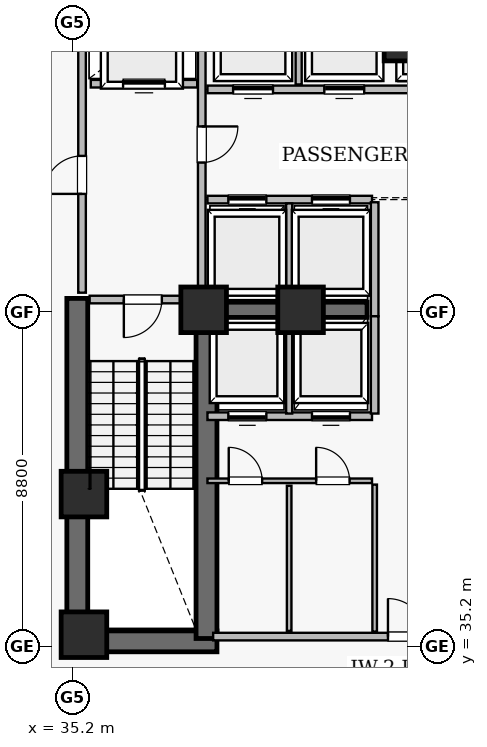
"""IFC4 building model, lengths in metres.
Left out: names, types, materials, properties, quantities, classifications, styles, units other than length and angle.
Written with IfcOpenShell. Run it as: python <this file> out.ifc"""

import sys

from ifc_helpers import new_model, si_unit, direction, frame, frame_2d, origin, origin_2d, place, context, subcontext, project, spatial, rectangle, extrude, element, fill, save


model = new_model("IFC4")
c1 = context("Model", 3, precision=1e-05, world=origin(), true_north=direction((0.0, 1.0)))
c2 = subcontext(c1, "Body", "Model", "MODEL_VIEW")
j1 = project(units=[si_unit("LENGTHUNIT", "METRE"), si_unit("PLANEANGLEUNIT", "RADIAN")], contexts=[c1])
p1 = place(None, origin())
s1 = spatial("IfcSite", under=j1, at=p1, CompositionType="ELEMENT")
p2 = place(p1, origin())
s2 = spatial("IfcBuilding", under=s1, at=p2, CompositionType="ELEMENT")
p3 = place(p2, frame((0.0, 0.0, 95.8)))
s3 = spatial("IfcBuildingStorey", under=s2, at=p3, CompositionType="ELEMENT", Elevation=95.8)
p4 = place(p3, frame((35.05, 35.325, 0.0), z_axis=(0.0, 0.0, 1.0), x_axis=(1.0, 0.0, 0.0)))
e1 = element("IfcWall", 1, at=p4, inside=s3, PredefinedType="SHEAR", context=c2, shape_type="SweptSolid", body=[
    extrude(rectangle(XDim=3.95, YDim=0.55, at=frame_2d((1.975, 0.0))), origin(), (0.0, 0.0, 1.0), 4.335),
])
p5 = place(p3, frame((35.325, 35.05, 0.0), z_axis=(0.0, 0.0, 1.0), x_axis=(0.0, 1.0, 0.0)))
e2 = element("IfcWall", 2, at=p5, inside=s3, PredefinedType="SHEAR", context=c2, shape_type="SweptSolid", body=[
    extrude(rectangle(XDim=9.3, YDim=0.55, at=frame_2d((4.65, 0.0))), origin(), (0.0, 0.0, 1.0), 4.335),
])
p6 = place(p3, frame((38.725, 35.4, 0.0), z_axis=(0.0, 0.0, 1.0), x_axis=(0.0, 1.0, 0.0)))
e3 = element("IfcWall", 3, at=p6, inside=s3, PredefinedType="SHEAR", context=c2, shape_type="SweptSolid", body=[
    extrude(rectangle(XDim=8.95, YDim=0.55, at=frame_2d((4.475, 0.0))), origin(), (0.0, 0.0, 1.0), 4.335),
])
p7 = place(p3, frame((44.0, 50.1, 0.0), z_axis=(0.0, 0.0, 1.0), x_axis=(0.0, 1.0, 0.0)))
e4 = element("IfcWall", 4, at=p7, inside=s3, PredefinedType="SHEAR", context=c2, shape_type="SweptSolid", body=[
    extrude(rectangle(XDim=2.1, YDim=0.4, at=frame_2d((1.05, 0.0))), origin(), (0.0, 0.0, 1.0), 4.335),
])
p8 = place(p3, frame((38.75, 44.05, 0.0), z_axis=(0.0, 0.0, 1.0), x_axis=(1.0, 0.0, 0.0)))
e5 = element("IfcWall", 5, at=p8, inside=s3, PredefinedType="SHEAR", context=c2, shape_type="SweptSolid", body=[
    extrude(rectangle(XDim=4.2, YDim=0.4, at=frame_2d((2.1, 0.0))), origin(), (0.0, 0.0, 1.0), 4.335),
])
for number, where, z_axis, x_axis in (
    (6, (35.5, 35.5, 0.0), (0.0, 0.0, 1.0), (1.0, 0.0, 0.0)),
    (7, (38.65, 44.05, 0.0), (0.0, 0.0, 1.0), (1.0, 0.0, 0.0)),
    (8, (44.0, 51.2, 0.0), (0.0, 0.0, 1.0), (1.0, 0.0, 0.0)),
    (9, (35.5, 39.2, 0.0), (0.0, 0.0, 1.0), (1.0, 0.0, 0.0)),
    (10, (41.2, 44.05, 0.0), (0.0, 0.0, 1.0), (1.0, 0.0, 0.0)),
):
    element("IfcColumn", number, at=place(p3, frame(where, z_axis=z_axis, x_axis=x_axis)), inside=s3, PredefinedType="COLUMN", context=c2, shape_type="SweptSolid", body=[
        extrude(rectangle(XDim=1.2, YDim=1.2, at=origin_2d()), origin(), (0.0, 0.0, 1.0), 4.6),
    ])
p9 = place(p3, frame((38.9, 35.45, 0.0), z_axis=(0.0, 0.0, 1.0), x_axis=(1.0, 0.0, 0.0)))
e11 = element("IfcWall", 11, at=p9, inside=s3, PredefinedType="SOLIDWALL", context=c2, shape_type="SweptSolid", body=[
    extrude(rectangle(XDim=10.2, YDim=0.2, at=frame_2d((5.1, 0.0))), origin(), (0.0, 0.0, 1.0), 4.335),
])
p10 = place(p9, frame((4.6, 0.0, 0.0)))
e12 = element("IfcOpeningElement", 12, at=p10, cuts=e11, PredefinedType="OPENING", context=c2, shape_type="SweptSolid", body=[
    extrude(rectangle(XDim=1.0, YDim=2.15, at=frame_2d((0.5, 1.075))), frame((0.0, 0.11, 0.0), z_axis=(0.0, -1.0, 0.0), x_axis=(1.0, 0.0, 0.0)), (0.0, 0.0, 1.0), 0.22),
])
p11 = place(p3, frame((35.45, 44.5, 0.0), z_axis=(0.0, 0.0, 1.0), x_axis=(0.0, 1.0, 0.0)))
e13 = element("IfcWall", 13, at=p11, inside=s3, PredefinedType="SOLIDWALL", context=c2, shape_type="SweptSolid", body=[
    extrude(rectangle(XDim=7.92, YDim=0.2, at=frame_2d((3.96, 0.0))), origin(), (0.0, 0.0, 1.0), 4.335),
])
p12 = place(p11, frame((2.6, 0.0, 0.0)))
e14 = element("IfcOpeningElement", 14, at=p12, cuts=e13, PredefinedType="OPENING", context=c2, shape_type="SweptSolid", body=[
    extrude(rectangle(XDim=1.0, YDim=2.15, at=frame_2d((0.5, 1.075))), frame((0.0, 0.11, 0.0), z_axis=(0.0, -1.0, 0.0), x_axis=(1.0, 0.0, 0.0)), (0.0, 0.0, 1.0), 0.22),
])
p13 = place(p3, frame((38.6, 44.5, 0.0), z_axis=(0.0, 0.0, 1.0), x_axis=(0.0, 1.0, 0.0)))
e15 = element("IfcWall", 15, at=p13, inside=s3, PredefinedType="SOLIDWALL", context=c2, shape_type="SweptSolid", body=[
    extrude(rectangle(XDim=7.92, YDim=0.2, at=frame_2d((3.96, 0.0))), origin(), (0.0, 0.0, 1.0), 4.335),
])
p14 = place(p13, frame((3.425, 0.0, 0.0)))
e16 = element("IfcOpeningElement", 16, at=p14, cuts=e15, PredefinedType="OPENING", context=c2, shape_type="SweptSolid", body=[
    extrude(rectangle(XDim=0.95, YDim=2.15, at=frame_2d((0.475, 1.075))), frame((0.0, 0.11, 0.0), z_axis=(0.0, -1.0, 0.0), x_axis=(1.0, 0.0, 0.0)), (0.0, 0.0, 1.0), 0.22),
])
p15 = place(p3, frame((38.75, 49.85, 0.0), z_axis=(0.0, 0.0, 1.0), x_axis=(1.0, 0.0, 0.0)))
e17 = element("IfcWall", 17, at=p15, inside=s3, PredefinedType="SOLIDWALL", context=c2, shape_type="SweptSolid", body=[
    extrude(rectangle(XDim=5.5, YDim=0.2, at=frame_2d((2.75, 0.0))), origin(), (0.0, 0.0, 1.0), 4.335),
])
p16 = place(p15, frame((0.675, 0.0, 0.0)))
e18 = element("IfcOpeningElement", 18, at=p16, cuts=e17, PredefinedType="OPENING", context=c2, shape_type="SweptSolid", body=[
    extrude(rectangle(XDim=1.05, YDim=2.15, at=frame_2d((0.525, 1.075))), frame((0.0, 0.11, 0.0), z_axis=(0.0, -1.0, 0.0), x_axis=(1.0, 0.0, 0.0)), (0.0, 0.0, 1.0), 0.22),
])
p17 = place(p15, frame((3.075, 0.0, 0.0)))
e19 = element("IfcOpeningElement", 19, at=p17, cuts=e17, PredefinedType="OPENING", context=c2, shape_type="SweptSolid", body=[
    extrude(rectangle(XDim=1.05, YDim=2.15, at=frame_2d((0.525, 1.075))), frame((0.0, 0.11, 0.0), z_axis=(0.0, -1.0, 0.0), x_axis=(1.0, 0.0, 0.0)), (0.0, 0.0, 1.0), 0.22),
])
p18 = place(p3, frame((38.75, 46.95, 0.0), z_axis=(0.0, 0.0, 1.0), x_axis=(1.0, 0.0, 0.0)))
e20 = element("IfcWall", 20, at=p18, inside=s3, PredefinedType="SOLIDWALL", context=c2, shape_type="SweptSolid", body=[
    extrude(rectangle(XDim=4.33, YDim=0.2, at=frame_2d((2.165, 0.0))), origin(), (0.0, 0.0, 1.0), 4.335),
])
p19 = place(p18, frame((0.55, 0.0, 0.0)))
e21 = element("IfcOpeningElement", 21, at=p19, cuts=e20, PredefinedType="OPENING", context=c2, shape_type="SweptSolid", body=[
    extrude(rectangle(XDim=1.0, YDim=2.15, at=frame_2d((0.5, 1.075))), frame((0.0, 0.11, 0.0), z_axis=(0.0, -1.0, 0.0), x_axis=(1.0, 0.0, 0.0)), (0.0, 0.0, 1.0), 0.22),
])
p20 = place(p18, frame((2.75, 0.0, 0.0)))
e22 = element("IfcOpeningElement", 22, at=p20, cuts=e20, PredefinedType="OPENING", context=c2, shape_type="SweptSolid", body=[
    extrude(rectangle(XDim=1.0, YDim=2.15, at=frame_2d((0.5, 1.075))), frame((0.0, 0.11, 0.0), z_axis=(0.0, -1.0, 0.0), x_axis=(1.0, 0.0, 0.0)), (0.0, 0.0, 1.0), 0.22),
])
p21 = place(p3, frame((38.75, 41.25, 0.0), z_axis=(0.0, 0.0, 1.0), x_axis=(1.0, 0.0, 0.0)))
e23 = element("IfcWall", 23, at=p21, inside=s3, PredefinedType="SOLIDWALL", context=c2, shape_type="SweptSolid", body=[
    extrude(rectangle(XDim=4.33, YDim=0.2, at=frame_2d((2.165, 0.0))), origin(), (0.0, 0.0, 1.0), 4.335),
])
p22 = place(p21, frame((0.55, 0.0, 0.0)))
e24 = element("IfcOpeningElement", 24, at=p22, cuts=e23, PredefinedType="OPENING", context=c2, shape_type="SweptSolid", body=[
    extrude(rectangle(XDim=1.0, YDim=2.15, at=frame_2d((0.5, 1.075))), frame((0.0, 0.11, 0.0), z_axis=(0.0, -1.0, 0.0), x_axis=(1.0, 0.0, 0.0)), (0.0, 0.0, 1.0), 0.22),
])
p23 = place(p21, frame((2.75, 0.0, 0.0)))
e25 = element("IfcOpeningElement", 25, at=p23, cuts=e23, PredefinedType="OPENING", context=c2, shape_type="SweptSolid", body=[
    extrude(rectangle(XDim=1.0, YDim=2.15, at=frame_2d((0.5, 1.075))), frame((0.0, 0.11, 0.0), z_axis=(0.0, -1.0, 0.0), x_axis=(1.0, 0.0, 0.0)), (0.0, 0.0, 1.0), 0.22),
])
p24 = place(p3, frame((38.75, 39.55, 0.0), z_axis=(0.0, 0.0, 1.0), x_axis=(1.0, 0.0, 0.0)))
e26 = element("IfcWall", 26, at=p24, inside=s3, PredefinedType="PARTITIONING", context=c2, shape_type="SweptSolid", body=[
    extrude(rectangle(XDim=4.33, YDim=0.12, at=frame_2d((2.165, 0.0))), origin(), (0.0, 0.0, 1.0), 4.335),
])
p25 = place(p24, frame((0.56, 0.0, 0.0)))
e27 = element("IfcOpeningElement", 27, at=p25, cuts=e26, PredefinedType="OPENING", context=c2, shape_type="SweptSolid", body=[
    extrude(rectangle(XDim=0.88, YDim=2.1, at=frame_2d((0.44, 1.05))), frame((0.0, 0.07, 0.0), z_axis=(0.0, -1.0, 0.0), x_axis=(1.0, 0.0, 0.0)), (0.0, 0.0, 1.0), 0.14),
])
p26 = place(p24, frame((2.86, 0.0, 0.0)))
e28 = element("IfcOpeningElement", 28, at=p26, cuts=e26, PredefinedType="OPENING", context=c2, shape_type="SweptSolid", body=[
    extrude(rectangle(XDim=0.88, YDim=2.1, at=frame_2d((0.44, 1.05))), frame((0.0, 0.07, 0.0), z_axis=(0.0, -1.0, 0.0), x_axis=(1.0, 0.0, 0.0)), (0.0, 0.0, 1.0), 0.14),
])
p27 = place(p3, frame((35.65, 44.32, 0.0), z_axis=(0.0, 0.0, 1.0), x_axis=(1.0, 0.0, 0.0)))
e29 = element("IfcWall", 29, at=p27, inside=s3, PredefinedType="SOLIDWALL", context=c2, shape_type="SweptSolid", body=[
    extrude(rectangle(XDim=2.8, YDim=0.2, at=frame_2d((1.4, 0.0))), origin(), (0.0, 0.0, 1.0), 4.335),
])
p28 = place(p27, frame((0.9, 0.0, 0.0)))
e30 = element("IfcOpeningElement", 30, at=p28, cuts=e29, PredefinedType="OPENING", context=c2, shape_type="SweptSolid", body=[
    extrude(rectangle(XDim=1.0, YDim=2.15, at=frame_2d((0.5, 1.075))), frame((0.0, 0.11, 0.0), z_axis=(0.0, -1.0, 0.0), x_axis=(1.0, 0.0, 0.0)), (0.0, 0.0, 1.0), 0.22),
])
p29 = place(p3, frame((35.68, 50.0, 0.0), z_axis=(0.0, 0.0, 1.0), x_axis=(1.0, 0.0, 0.0)))
e31 = element("IfcWall", 31, at=p29, inside=s3, PredefinedType="SOLIDWALL", context=c2, shape_type="SweptSolid", body=[
    extrude(rectangle(XDim=2.8, YDim=0.2, at=frame_2d((1.4, 0.0))), origin(), (0.0, 0.0, 1.0), 4.335),
])
p30 = place(p29, frame((0.85, 0.0, 0.0)))
e32 = element("IfcOpeningElement", 32, at=p30, cuts=e31, PredefinedType="OPENING", context=c2, shape_type="SweptSolid", body=[
    extrude(rectangle(XDim=1.1, YDim=2.15, at=frame_2d((0.55, 1.075))), frame((0.0, 0.11, 0.0), z_axis=(0.0, -1.0, 0.0), x_axis=(1.0, 0.0, 0.0)), (0.0, 0.0, 1.0), 0.22),
])
p31 = place(p3, frame((43.15, 35.58, 0.0), z_axis=(0.0, 0.0, 1.0), x_axis=(0.0, 1.0, 0.0)))
e33 = element("IfcWall", 33, at=p31, inside=s3, PredefinedType="PARTITIONING", context=c2, shape_type="SweptSolid", body=[
    extrude(rectangle(XDim=3.87, YDim=0.12, at=frame_2d((1.935, 0.0))), origin(), (0.0, 0.0, 1.0), 4.335),
])
p32 = place(p3, frame((40.9, 35.6, 0.0), z_axis=(0.0, 0.0, 1.0), x_axis=(0.0, 1.0, 0.0)))
e34 = element("IfcWall", 34, at=p32, inside=s3, PredefinedType="PARTITIONING", context=c2, shape_type="SweptSolid", body=[
    extrude(rectangle(XDim=3.82, YDim=0.12, at=frame_2d((1.91, 0.0))), origin(), (0.0, 0.0, 1.0), 4.335),
])
p33 = place(p3, frame((43.15, 43.88, 0.0), z_axis=(0.0, 0.0, 1.0), x_axis=(0.0, 1.0, 0.0)))
e35 = element("IfcWall", 35, at=p33, inside=s3, PredefinedType="SOLIDWALL", context=c2, shape_type="SweptSolid", body=[
    extrude(rectangle(XDim=3.0, YDim=0.2, at=frame_2d((1.5, 0.0))), origin(), (0.0, 0.0, 1.0), 4.335),
])
p34 = place(p3, frame((43.15, 41.32, 0.0), z_axis=(0.0, 0.0, 1.0), x_axis=(0.0, 1.0, 0.0)))
e36 = element("IfcWall", 36, at=p34, inside=s3, PredefinedType="SOLIDWALL", context=c2, shape_type="SweptSolid", body=[
    extrude(rectangle(XDim=2.56, YDim=0.2, at=frame_2d((1.28, 0.0))), origin(), (0.0, 0.0, 1.0), 4.335),
])
p35 = place(p3, frame((40.9, 44.3, 0.0), z_axis=(0.0, 0.0, 1.0), x_axis=(0.0, 1.0, 0.0)))
e37 = element("IfcWall", 37, at=p35, inside=s3, PredefinedType="SOLIDWALL", context=c2, shape_type="SweptSolid", body=[
    extrude(rectangle(XDim=2.55, YDim=0.16, at=frame_2d((1.275, 0.0))), origin(), (0.0, 0.0, 1.0), 4.335),
])
p36 = place(p3, frame((40.9, 41.32, 0.0), z_axis=(0.0, 0.0, 1.0), x_axis=(0.0, 1.0, 0.0)))
e38 = element("IfcWall", 38, at=p36, inside=s3, PredefinedType="SOLIDWALL", context=c2, shape_type="SweptSolid", body=[
    extrude(rectangle(XDim=2.53, YDim=0.16, at=frame_2d((1.265, 0.0))), origin(), (0.0, 0.0, 1.0), 4.335),
])
p37 = place(p3, frame((41.15, 49.98, 0.0), z_axis=(0.0, 0.0, 1.0), x_axis=(0.0, 1.0, 0.0)))
e39 = element("IfcWall", 39, at=p37, inside=s3, PredefinedType="SOLIDWALL", context=c2, shape_type="SweptSolid", body=[
    extrude(rectangle(XDim=2.37, YDim=0.16, at=frame_2d((1.185, 0.0))), origin(), (0.0, 0.0, 1.0), 4.335),
])
p38 = place(p28, frame((1.0, 0.0, 0.0), z_axis=(0.0, 0.0, 1.0), x_axis=(-1.0, 0.0, 0.0)))
e40 = element("IfcDoor", 40, at=p38, inside=s3, OperationType="SINGLE_SWING_LEFT", PredefinedType="DOOR", context=c2, shape_type="SweptSolid", body=[
    extrude(rectangle(XDim=1.0, YDim=2.15, at=frame_2d((0.5, 1.075))), frame((0.0, 0.025, 0.0), z_axis=(0.0, -1.0, 0.0), x_axis=(1.0, 0.0, 0.0)), (0.0, 0.0, 1.0), 0.05),
])
fill(e30, e40)
p39 = place(p12, origin())
e41 = element("IfcDoor", 41, at=p39, inside=s3, OperationType="SINGLE_SWING_LEFT", PredefinedType="DOOR", context=c2, shape_type="SweptSolid", body=[
    extrude(rectangle(XDim=1.0, YDim=2.15, at=frame_2d((0.5, 1.075))), frame((0.0, 0.025, 0.0), z_axis=(0.0, -1.0, 0.0), x_axis=(1.0, 0.0, 0.0)), (0.0, 0.0, 1.0), 0.05),
])
fill(e14, e41)
p40 = place(p14, frame((0.95, 0.0, 0.0), z_axis=(0.0, 0.0, 1.0), x_axis=(-1.0, 0.0, 0.0)))
e42 = element("IfcDoor", 42, at=p40, inside=s3, OperationType="SINGLE_SWING_RIGHT", PredefinedType="DOOR", context=c2, shape_type="SweptSolid", body=[
    extrude(rectangle(XDim=0.95, YDim=2.15, at=frame_2d((0.475, 1.075))), frame((0.0, 0.025, 0.0), z_axis=(0.0, -1.0, 0.0), x_axis=(1.0, 0.0, 0.0)), (0.0, 0.0, 1.0), 0.05),
])
fill(e16, e42)
p41 = place(p30, origin())
e43 = element("IfcDoor", 43, at=p41, inside=s3, OperationType="SLIDING_TO_LEFT", PredefinedType="DOOR", context=c2, shape_type="SweptSolid", body=[
    extrude(rectangle(XDim=1.1, YDim=2.15, at=frame_2d((0.55, 1.075))), frame((0.0, 0.025, 0.0), z_axis=(0.0, -1.0, 0.0), x_axis=(1.0, 0.0, 0.0)), (0.0, 0.0, 1.0), 0.05),
])
fill(e32, e43)
p42 = place(p10, origin())
e44 = element("IfcDoor", 44, at=p42, inside=s3, OperationType="SINGLE_SWING_LEFT", PredefinedType="DOOR", context=c2, shape_type="SweptSolid", body=[
    extrude(rectangle(XDim=1.0, YDim=2.15, at=frame_2d((0.5, 1.075))), frame((0.0, 0.025, 0.0), z_axis=(0.0, -1.0, 0.0), x_axis=(1.0, 0.0, 0.0)), (0.0, 0.0, 1.0), 0.05),
])
fill(e12, e44)
p43 = place(p16, origin())
e45 = element("IfcDoor", 45, at=p43, inside=s3, OperationType="SLIDING_TO_LEFT", PredefinedType="DOOR", context=c2, shape_type="SweptSolid", body=[
    extrude(rectangle(XDim=1.05, YDim=2.15, at=frame_2d((0.525, 1.075))), frame((0.0, 0.025, 0.0), z_axis=(0.0, -1.0, 0.0), x_axis=(1.0, 0.0, 0.0)), (0.0, 0.0, 1.0), 0.05),
])
fill(e18, e45)
p44 = place(p17, origin())
e46 = element("IfcDoor", 46, at=p44, inside=s3, OperationType="SLIDING_TO_LEFT", PredefinedType="DOOR", context=c2, shape_type="SweptSolid", body=[
    extrude(rectangle(XDim=1.05, YDim=2.15, at=frame_2d((0.525, 1.075))), frame((0.0, 0.025, 0.0), z_axis=(0.0, -1.0, 0.0), x_axis=(1.0, 0.0, 0.0)), (0.0, 0.0, 1.0), 0.05),
])
fill(e19, e46)
p45 = place(p19, origin())
e47 = element("IfcDoor", 47, at=p45, inside=s3, OperationType="SLIDING_TO_LEFT", PredefinedType="DOOR", context=c2, shape_type="SweptSolid", body=[
    extrude(rectangle(XDim=1.0, YDim=2.15, at=frame_2d((0.5, 1.075))), frame((0.0, 0.025, 0.0), z_axis=(0.0, -1.0, 0.0), x_axis=(1.0, 0.0, 0.0)), (0.0, 0.0, 1.0), 0.05),
])
fill(e21, e47)
p46 = place(p20, origin())
e48 = element("IfcDoor", 48, at=p46, inside=s3, OperationType="SLIDING_TO_LEFT", PredefinedType="DOOR", context=c2, shape_type="SweptSolid", body=[
    extrude(rectangle(XDim=1.0, YDim=2.15, at=frame_2d((0.5, 1.075))), frame((0.0, 0.025, 0.0), z_axis=(0.0, -1.0, 0.0), x_axis=(1.0, 0.0, 0.0)), (0.0, 0.0, 1.0), 0.05),
])
fill(e22, e48)
p47 = place(p22, frame((1.0, 0.0, 0.0), z_axis=(0.0, 0.0, 1.0), x_axis=(-1.0, 0.0, 0.0)))
e49 = element("IfcDoor", 49, at=p47, inside=s3, OperationType="SLIDING_TO_LEFT", PredefinedType="DOOR", context=c2, shape_type="SweptSolid", body=[
    extrude(rectangle(XDim=1.0, YDim=2.15, at=frame_2d((0.5, 1.075))), frame((0.0, 0.025, 0.0), z_axis=(0.0, -1.0, 0.0), x_axis=(1.0, 0.0, 0.0)), (0.0, 0.0, 1.0), 0.05),
])
fill(e24, e49)
p48 = place(p23, frame((1.0, 0.0, 0.0), z_axis=(0.0, 0.0, 1.0), x_axis=(-1.0, 0.0, 0.0)))
e50 = element("IfcDoor", 50, at=p48, inside=s3, OperationType="SLIDING_TO_LEFT", PredefinedType="DOOR", context=c2, shape_type="SweptSolid", body=[
    extrude(rectangle(XDim=1.0, YDim=2.15, at=frame_2d((0.5, 1.075))), frame((0.0, 0.025, 0.0), z_axis=(0.0, -1.0, 0.0), x_axis=(1.0, 0.0, 0.0)), (0.0, 0.0, 1.0), 0.05),
])
fill(e25, e50)
p49 = place(p25, origin())
e51 = element("IfcDoor", 51, at=p49, inside=s3, OperationType="SINGLE_SWING_LEFT", PredefinedType="DOOR", context=c2, shape_type="SweptSolid", body=[
    extrude(rectangle(XDim=0.88, YDim=2.1, at=frame_2d((0.44, 1.05))), frame((0.0, 0.025, 0.0), z_axis=(0.0, -1.0, 0.0), x_axis=(1.0, 0.0, 0.0)), (0.0, 0.0, 1.0), 0.05),
])
fill(e27, e51)
p50 = place(p26, origin())
e52 = element("IfcDoor", 52, at=p50, inside=s3, OperationType="SINGLE_SWING_LEFT", PredefinedType="DOOR", context=c2, shape_type="SweptSolid", body=[
    extrude(rectangle(XDim=0.88, YDim=2.1, at=frame_2d((0.44, 1.05))), frame((0.0, 0.025, 0.0), z_axis=(0.0, -1.0, 0.0), x_axis=(1.0, 0.0, 0.0)), (0.0, 0.0, 1.0), 0.05),
])
fill(e28, e52)
save(model, sys.argv[1])
